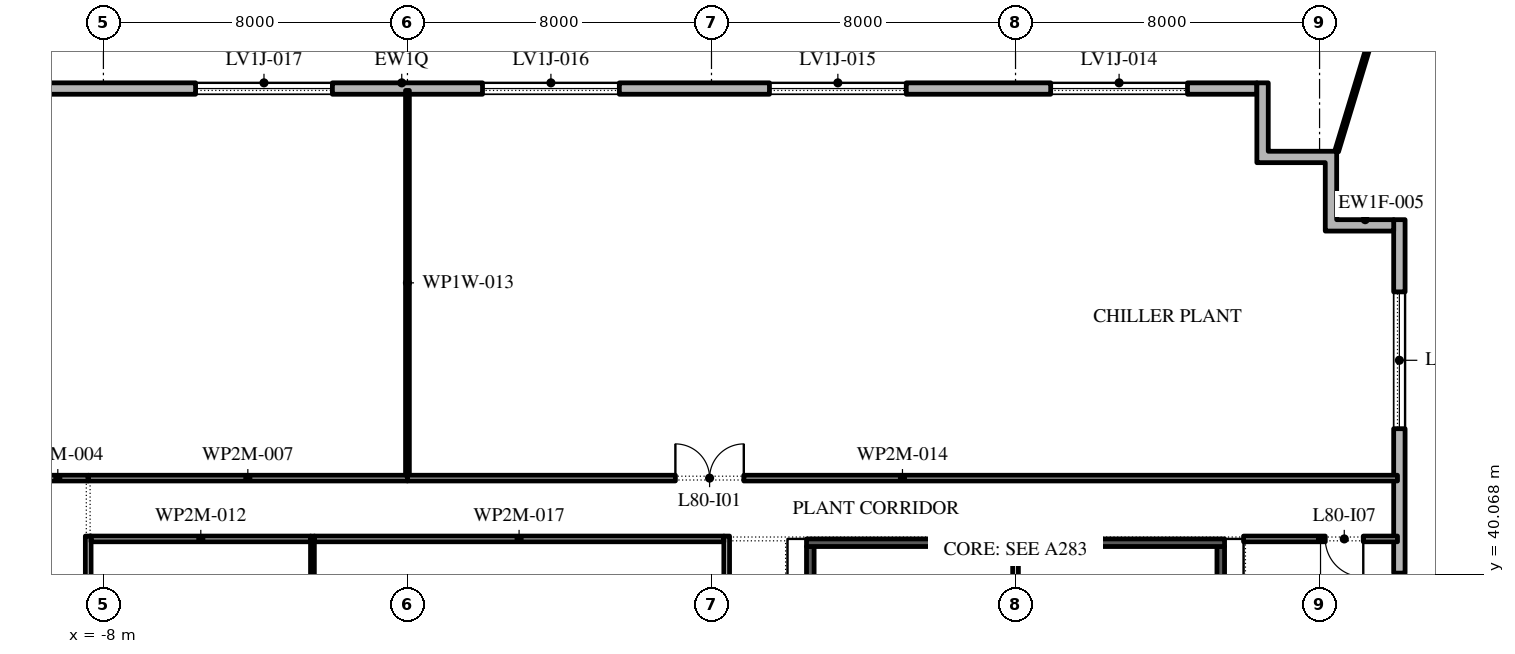
"""IFC4 building model, lengths in metres.
Left out: names, types, materials, properties, quantities, classifications, styles, units other than length and angle.
Written with IfcOpenShell. Run it as: python <this file> out.ifc"""

import sys

from ifc_helpers import new_model, si_unit, direction, frame, frame_2d, origin, place, context, subcontext, project, spatial, polyline, rectangle, outline, extrude, element, fill, save


model = new_model("IFC4")
c1 = context("Model", 3, precision=1e-05, world=origin(), true_north=direction((0.0, 1.0)))
c2 = subcontext(c1, "Body", "Model", "MODEL_VIEW")
j1 = project(units=[si_unit("LENGTHUNIT", "METRE"), si_unit("PLANEANGLEUNIT", "RADIAN")], contexts=[c1])
p1 = place(None, origin())
s1 = spatial("IfcSite", under=j1, at=p1, CompositionType="ELEMENT")
p2 = place(p1, origin())
s2 = spatial("IfcBuilding", under=s1, at=p2, CompositionType="ELEMENT")
p3 = place(p2, frame((0.0, 0.0, 363.6)))
s3 = spatial("IfcBuildingStorey", under=s2, at=p3, CompositionType="ELEMENT", Elevation=363.6)
p4 = place(p3, frame((26.1, -2.1, 0.0), z_axis=(0.0, 0.0, 1.0), x_axis=(0.0, 1.0, 0.0)))
e1 = element("IfcWall", 1, at=p4, inside=s3, PredefinedType="STANDARD", context=c2, shape_type="SweptSolid", body=[
    extrude(rectangle(XDim=51.5, YDim=0.3, at=frame_2d((25.75, 0.0))), origin(), (0.0, 0.0, 1.0), 5.2),
])
p5 = place(p4, frame((1.75, 0.0, 0.6)))
e2 = element("IfcOpeningElement", 2, at=p5, cuts=e1, PredefinedType="OPENING", context=c2, shape_type="SweptSolid", body=[
    extrude(rectangle(XDim=3.6, YDim=4.1, at=frame_2d((1.8, 2.05))), frame((0.0, 0.16, 0.0), z_axis=(0.0, -1.0, 0.0), x_axis=(1.0, 0.0, 0.0)), (0.0, 0.0, 1.0), 0.32),
])
p6 = place(p4, frame((9.0, 0.0, 0.6)))
e3 = element("IfcOpeningElement", 3, at=p6, cuts=e1, PredefinedType="OPENING", context=c2, shape_type="SweptSolid", body=[
    extrude(rectangle(XDim=3.6, YDim=4.1, at=frame_2d((1.8, 2.05))), frame((0.0, 0.16, 0.0), z_axis=(0.0, -1.0, 0.0), x_axis=(1.0, 0.0, 0.0)), (0.0, 0.0, 1.0), 0.32),
])
p7 = place(p4, frame((16.4, 0.0, 0.6)))
e4 = element("IfcOpeningElement", 4, at=p7, cuts=e1, PredefinedType="OPENING", context=c2, shape_type="SweptSolid", body=[
    extrude(rectangle(XDim=3.6, YDim=4.15, at=frame_2d((1.8, 2.075))), frame((0.0, 0.16, 0.0), z_axis=(0.0, -1.0, 0.0), x_axis=(1.0, 0.0, 0.0)), (0.0, 0.0, 1.0), 0.32),
])
p8 = place(p4, frame((23.8, 0.0, 0.6)))
e5 = element("IfcOpeningElement", 5, at=p8, cuts=e1, PredefinedType="OPENING", context=c2, shape_type="SweptSolid", body=[
    extrude(rectangle(XDim=3.6, YDim=4.15, at=frame_2d((1.8, 2.075))), frame((0.0, 0.16, 0.0), z_axis=(0.0, -1.0, 0.0), x_axis=(1.0, 0.0, 0.0)), (0.0, 0.0, 1.0), 0.32),
])
p9 = place(p4, frame((31.2, 0.0, 0.6)))
e6 = element("IfcOpeningElement", 6, at=p9, cuts=e1, PredefinedType="OPENING", context=c2, shape_type="SweptSolid", body=[
    extrude(rectangle(XDim=3.6, YDim=4.15, at=frame_2d((1.8, 2.075))), frame((0.0, 0.16, 0.0), z_axis=(0.0, -1.0, 0.0), x_axis=(1.0, 0.0, 0.0)), (0.0, 0.0, 1.0), 0.32),
])
p10 = place(p4, frame((38.6, 0.0, 0.6)))
e7 = element("IfcOpeningElement", 7, at=p10, cuts=e1, PredefinedType="OPENING", context=c2, shape_type="SweptSolid", body=[
    extrude(rectangle(XDim=3.6, YDim=4.15, at=frame_2d((1.8, 2.075))), frame((0.0, 0.16, 0.0), z_axis=(0.0, -1.0, 0.0), x_axis=(1.0, 0.0, 0.0)), (0.0, 0.0, 1.0), 0.32),
])
p11 = place(p4, frame((46.0, 0.0, 0.6)))
e8 = element("IfcOpeningElement", 8, at=p11, cuts=e1, PredefinedType="OPENING", context=c2, shape_type="SweptSolid", body=[
    extrude(rectangle(XDim=3.6, YDim=4.15, at=frame_2d((1.8, 2.075))), frame((0.0, 0.16, 0.0), z_axis=(0.0, -1.0, 0.0), x_axis=(1.0, 0.0, 0.0)), (0.0, 0.0, 1.0), 0.32),
])
p12 = place(p3, frame((22.35, 52.85, 0.0), z_axis=(0.0, 0.0, 1.0), x_axis=(-1.0, 0.0, 0.0)))
e9 = element("IfcWall", 9, at=p12, inside=s3, PredefinedType="STANDARD", context=c2, shape_type="SweptSolid", body=[
    extrude(rectangle(XDim=45.0, YDim=0.3, at=frame_2d((22.5, 0.0))), origin(), (0.0, 0.0, 1.0), 4.22),
])
p13 = place(p12, frame((1.825, 0.0, 0.6)))
e10 = element("IfcOpeningElement", 10, at=p13, cuts=e9, PredefinedType="OPENING", context=c2, shape_type="SweptSolid", body=[
    extrude(rectangle(XDim=3.6, YDim=3.5, at=frame_2d((1.8, 1.75))), frame((0.0, 0.16, 0.0), z_axis=(0.0, -1.0, 0.0), x_axis=(1.0, 0.0, 0.0)), (0.0, 0.0, 1.0), 0.32),
])
p14 = place(p12, frame((9.225, 0.0, 0.6)))
e11 = element("IfcOpeningElement", 11, at=p14, cuts=e9, PredefinedType="OPENING", context=c2, shape_type="SweptSolid", body=[
    extrude(rectangle(XDim=3.6, YDim=3.5, at=frame_2d((1.8, 1.75))), frame((0.0, 0.16, 0.0), z_axis=(0.0, -1.0, 0.0), x_axis=(1.0, 0.0, 0.0)), (0.0, 0.0, 1.0), 0.32),
])
p15 = place(p12, frame((16.775, 0.0, 0.6)))
e12 = element("IfcOpeningElement", 12, at=p15, cuts=e9, PredefinedType="OPENING", context=c2, shape_type="SweptSolid", body=[
    extrude(rectangle(XDim=3.6, YDim=3.5, at=frame_2d((1.8, 1.75))), frame((0.0, 0.16, 0.0), z_axis=(0.0, -1.0, 0.0), x_axis=(1.0, 0.0, 0.0)), (0.0, 0.0, 1.0), 0.32),
])
p16 = place(p12, frame((24.325, 0.0, 0.6)))
e13 = element("IfcOpeningElement", 13, at=p16, cuts=e9, PredefinedType="OPENING", context=c2, shape_type="SweptSolid", body=[
    extrude(rectangle(XDim=3.6, YDim=3.5, at=frame_2d((1.8, 1.75))), frame((0.0, 0.16, 0.0), z_axis=(0.0, -1.0, 0.0), x_axis=(1.0, 0.0, 0.0)), (0.0, 0.0, 1.0), 0.32),
])
p17 = place(p12, frame((31.875, 0.0, 0.6)))
e14 = element("IfcOpeningElement", 14, at=p17, cuts=e9, PredefinedType="OPENING", context=c2, shape_type="SweptSolid", body=[
    extrude(rectangle(XDim=3.6, YDim=3.5, at=frame_2d((1.8, 1.75))), frame((0.0, 0.16, 0.0), z_axis=(0.0, -1.0, 0.0), x_axis=(1.0, 0.0, 0.0)), (0.0, 0.0, 1.0), 0.32),
])
p18 = place(p12, frame((39.425, 0.0, 0.6)))
e15 = element("IfcOpeningElement", 15, at=p18, cuts=e9, PredefinedType="OPENING", context=c2, shape_type="SweptSolid", body=[
    extrude(rectangle(XDim=3.6, YDim=3.5, at=frame_2d((1.8, 1.75))), frame((0.0, 0.16, 0.0), z_axis=(0.0, -1.0, 0.0), x_axis=(1.0, 0.0, 0.0)), (0.0, 0.0, 1.0), 0.32),
])
p19 = place(p3, origin())
e16 = element("IfcWall", 16, at=p19, inside=s3, PredefinedType="STANDARD", context=c2, shape_type="SweptSolid", body=[
    extrude(outline(polyline([(24.15, 50.9), (22.35, 50.9), (22.35, 53.0), (22.65, 53.0), (22.65, 51.2), (24.45, 51.2), (24.45, 49.4), (25.95, 49.4), (25.95, 49.1), (24.15, 49.1), (24.15, 50.9)])), origin(), (0.0, 0.0, 1.0), 5.2),
])
p20 = place(p3, frame((24.45, 51.2, -0.05), z_axis=(0.0, 0.0, 1.0), x_axis=(0.290383107351, 0.956910471761, 0.0)))
e17 = element("IfcWall", 17, at=p20, inside=s3, PredefinedType="STANDARD", context=c2, shape_type="SweptSolid", body=[
    extrude(rectangle(XDim=7.538, YDim=0.1, at=frame_2d((3.769, 0.0))), origin(), (0.0, 0.0, 1.0), 5.25),
])
p21 = place(p3, frame((21.4, 25.75, 0.0), z_axis=(0.0, 0.0, 1.0), x_axis=(0.0, 1.0, 0.0)))
e18 = element("IfcWall", 18, at=p21, inside=s3, PredefinedType="SHEAR", context=c2, shape_type="SweptSolid", body=[
    extrude(rectangle(XDim=15.05, YDim=0.2, at=frame_2d((7.525, 0.0))), origin(), (0.0, 0.0, 1.0), 5.2),
])
p22 = place(p21, frame((6.625, 0.0, 0.0)))
e19 = element("IfcOpeningElement", 19, at=p22, cuts=e18, PredefinedType="OPENING", context=c2, shape_type="SweptSolid", body=[
    extrude(rectangle(XDim=1.8, YDim=2.4, at=frame_2d((0.9, 1.2))), frame((0.0, 0.11, 0.0), z_axis=(0.0, -1.0, 0.0), x_axis=(1.0, 0.0, 0.0)), (0.0, 0.0, 1.0), 0.22),
])
p23 = place(p3, frame((10.6, 25.75, 0.0), z_axis=(0.0, 0.0, 1.0), x_axis=(0.0, 1.0, 0.0)))
e20 = element("IfcWall", 20, at=p23, inside=s3, PredefinedType="SHEAR", context=c2, shape_type="SweptSolid", body=[
    extrude(rectangle(XDim=15.05, YDim=0.2, at=frame_2d((7.525, 0.0))), origin(), (0.0, 0.0, 1.0), 5.2),
])
p24 = place(p23, frame((2.837, 0.0, 0.0)))
e21 = element("IfcOpeningElement", 21, at=p24, cuts=e20, PredefinedType="OPENING", context=c2, shape_type="SweptSolid", body=[
    extrude(rectangle(XDim=1.8, YDim=2.4, at=frame_2d((0.9, 1.2))), frame((0.0, 0.11, 0.0), z_axis=(0.0, -1.0, 0.0), x_axis=(1.0, 0.0, 0.0)), (0.0, 0.0, 1.0), 0.22),
])
p25 = place(p23, frame((10.438, 0.0, 0.0)))
e22 = element("IfcOpeningElement", 22, at=p25, cuts=e20, PredefinedType="OPENING", context=c2, shape_type="SweptSolid", body=[
    extrude(rectangle(XDim=1.8, YDim=2.4, at=frame_2d((0.9, 1.2))), frame((0.0, 0.11, 0.0), z_axis=(0.0, -1.0, 0.0), x_axis=(1.0, 0.0, 0.0)), (0.0, 0.0, 1.0), 0.22),
])
p26 = place(p3, frame((10.5, 40.9, 0.0), z_axis=(0.0, 0.0, 1.0), x_axis=(1.0, 0.0, 0.0)))
e23 = element("IfcWall", 23, at=p26, inside=s3, PredefinedType="SHEAR", context=c2, shape_type="SweptSolid", body=[
    extrude(rectangle(XDim=11.0, YDim=0.2, at=frame_2d((5.5, 0.0))), origin(), (0.0, 0.0, 1.0), 5.2),
])
p27 = place(p3, frame((16.0, 25.75, 0.0), z_axis=(0.0, 0.0, 1.0), x_axis=(0.0, 1.0, 0.0)))
e24 = element("IfcWall", 24, at=p27, inside=s3, PredefinedType="PARTITIONING", context=c2, shape_type="SweptSolid", body=[
    extrude(rectangle(XDim=15.05, YDim=0.15, at=frame_2d((7.525, 0.0))), origin(), (0.0, 0.0, 1.0), 5.2),
])
p28 = place(p3, frame((-10.0, 42.6, 0.0), z_axis=(0.0, 0.0, 1.0), x_axis=(1.0, 0.0, 0.0)))
e25 = element("IfcWall", 25, at=p28, inside=s3, PredefinedType="PARTITIONING", context=c2, shape_type="SweptSolid", body=[
    extrude(rectangle(XDim=1.6, YDim=0.15, at=frame_2d((0.8, 0.0))), origin(), (0.0, 0.0, 1.0), 5.2),
])
p29 = place(p3, frame((-8.4, 41.075, 0.0), z_axis=(0.0, 0.0, 1.0), x_axis=(0.0, -1.0, 0.0)))
e26 = element("IfcWall", 26, at=p29, inside=s3, PredefinedType="PARTITIONING", context=c2, shape_type="SweptSolid", body=[
    extrude(rectangle(XDim=22.0, YDim=0.15, at=frame_2d((11.0, 0.0))), origin(), (0.0, 0.0, 1.0), 5.2),
])
p30 = place(p29, frame((14.925, 0.0, 0.0)))
e27 = element("IfcOpeningElement", 27, at=p30, cuts=e26, PredefinedType="OPENING", context=c2, shape_type="SweptSolid", body=[
    extrude(rectangle(XDim=1.0, YDim=2.1, at=frame_2d((0.5, 1.05))), frame((0.0, 0.085, 0.0), z_axis=(0.0, -1.0, 0.0), x_axis=(1.0, 0.0, 0.0)), (0.0, 0.0, 1.0), 0.17),
])
p31 = place(p3, frame((-8.4, 42.6, 0.0), z_axis=(0.0, 0.0, 1.0), x_axis=(1.0, 0.0, 0.0)))
e28 = element("IfcWall", 28, at=p31, inside=s3, PredefinedType="PARTITIONING", context=c2, shape_type="SweptSolid", body=[
    extrude(rectangle(XDim=8.4, YDim=0.15, at=frame_2d((4.2, 0.0))), origin(), (0.0, 0.0, 1.0), 5.2),
])
p32 = place(p3, frame((-2.5, 26.45, 0.0), z_axis=(0.0, 0.0, 1.0), x_axis=(0.0, 1.0, 0.0)))
e29 = element("IfcWall", 29, at=p32, inside=s3, PredefinedType="PARTITIONING", context=c2, shape_type="SweptSolid", body=[
    extrude(rectangle(XDim=14.625, YDim=0.1, at=frame_2d((7.312, 0.0))), origin(), (0.0, 0.0, 1.0), 4.22),
])
p33 = place(p3, frame((-2.55, 41.0, 0.0), z_axis=(0.0, 0.0, 1.0), x_axis=(-1.0, 0.0, 0.0)))
e30 = element("IfcWall", 30, at=p33, inside=s3, PredefinedType="PARTITIONING", context=c2, shape_type="SweptSolid", body=[
    extrude(rectangle(XDim=5.775, YDim=0.15, at=frame_2d((2.887, 0.0))), origin(), (0.0, 0.0, 1.0), 5.2),
])
p34 = place(p3, frame((0.0, 42.675, 0.0), z_axis=(0.0, 0.0, 1.0), x_axis=(0.0, 1.0, 0.0)))
e31 = element("IfcWall", 31, at=p34, inside=s3, PredefinedType="PARTITIONING", context=c2, shape_type="SweptSolid", body=[
    extrude(rectangle(XDim=10.125, YDim=0.1, at=frame_2d((5.062, 0.0))), origin(), (0.0, 0.0, 1.0), 5.2),
])
p35 = place(p3, frame((0.0, 42.6, 0.0), z_axis=(0.0, 0.0, 1.0), x_axis=(1.0, 0.0, 0.0)))
e32 = element("IfcWall", 32, at=p35, inside=s3, PredefinedType="PARTITIONING", context=c2, shape_type="SweptSolid", body=[
    extrude(rectangle(XDim=26.05, YDim=0.15, at=frame_2d((13.025, 0.0))), origin(), (0.0, 0.0, 1.0), 5.2),
])
p36 = place(p35, frame((7.05, 0.0, 0.0)))
e33 = element("IfcOpeningElement", 33, at=p36, cuts=e32, PredefinedType="OPENING", context=c2, shape_type="SweptSolid", body=[
    extrude(rectangle(XDim=1.8, YDim=2.1, at=frame_2d((0.9, 1.05))), frame((0.0, 0.085, 0.0), z_axis=(0.0, -1.0, 0.0), x_axis=(1.0, 0.0, 0.0)), (0.0, 0.0, 1.0), 0.17),
])
p37 = place(p3, frame((8.4, 26.55, 0.0), z_axis=(0.0, 0.0, 1.0), x_axis=(0.0, 1.0, 0.0)))
e34 = element("IfcWall", 34, at=p37, inside=s3, PredefinedType="PARTITIONING", context=c2, shape_type="SweptSolid", body=[
    extrude(rectangle(XDim=14.525, YDim=0.15, at=frame_2d((7.262, 0.0))), origin(), (0.0, 0.0, 1.0), 5.2),
])
p38 = place(p37, frame((8.05, 0.0, 0.0)))
e35 = element("IfcOpeningElement", 35, at=p38, cuts=e34, PredefinedType="OPENING", context=c2, shape_type="SweptSolid", body=[
    extrude(rectangle(XDim=1.0, YDim=2.1, at=frame_2d((0.5, 1.05))), frame((0.0, 0.085, 0.0), z_axis=(0.0, -1.0, 0.0), x_axis=(1.0, 0.0, 0.0)), (0.0, 0.0, 1.0), 0.17),
])
p39 = place(p3, frame((8.325, 41.0, 0.0), z_axis=(0.0, 0.0, 1.0), x_axis=(-1.0, 0.0, 0.0)))
e36 = element("IfcWall", 36, at=p39, inside=s3, PredefinedType="PARTITIONING", context=c2, shape_type="SweptSolid", body=[
    extrude(rectangle(XDim=10.775, YDim=0.15, at=frame_2d((5.387, 0.0))), origin(), (0.0, 0.0, 1.0), 5.2),
])
p40 = place(p3, frame((26.05, 41.0, 0.0), z_axis=(0.0, 0.0, 1.0), x_axis=(-1.0, 0.0, 0.0)))
e37 = element("IfcWall", 37, at=p40, inside=s3, PredefinedType="PARTITIONING", context=c2, shape_type="SweptSolid", body=[
    extrude(rectangle(XDim=4.05, YDim=0.15, at=frame_2d((2.025, 0.0))), origin(), (0.0, 0.0, 1.0), 5.2),
])
p41 = place(p40, frame((0.9, 0.0, 0.0)))
e38 = element("IfcOpeningElement", 38, at=p41, cuts=e37, PredefinedType="OPENING", context=c2, shape_type="SweptSolid", body=[
    extrude(rectangle(XDim=1.0, YDim=2.1, at=frame_2d((0.5, 1.05))), frame((0.0, 0.085, 0.0), z_axis=(0.0, -1.0, 0.0), x_axis=(1.0, 0.0, 0.0)), (0.0, 0.0, 1.0), 0.17),
])
p42 = place(p10, origin())
e39 = element("IfcWindow", 39, at=p42, inside=s3, PartitioningType="DOUBLE_PANEL_HORIZONTAL", PredefinedType="WINDOW", context=c2, shape_type="SweptSolid", body=[
    extrude(rectangle(XDim=3.6, YDim=4.15, at=frame_2d((1.8, 2.075))), frame((0.0, 0.03, 0.0), z_axis=(0.0, -1.0, 0.0), x_axis=(1.0, 0.0, 0.0)), (0.0, 0.0, 1.0), 0.06),
])
fill(e7, e39)
p43 = place(p11, origin())
e40 = element("IfcWindow", 40, at=p43, inside=s3, PartitioningType="DOUBLE_PANEL_HORIZONTAL", PredefinedType="WINDOW", context=c2, shape_type="SweptSolid", body=[
    extrude(rectangle(XDim=3.6, YDim=4.15, at=frame_2d((1.8, 2.075))), frame((0.0, 0.03, 0.0), z_axis=(0.0, -1.0, 0.0), x_axis=(1.0, 0.0, 0.0)), (0.0, 0.0, 1.0), 0.06),
])
fill(e8, e40)
p44 = place(p13, origin())
e41 = element("IfcWindow", 41, at=p44, inside=s3, PartitioningType="DOUBLE_PANEL_HORIZONTAL", PredefinedType="WINDOW", context=c2, shape_type="SweptSolid", body=[
    extrude(rectangle(XDim=3.6, YDim=3.5, at=frame_2d((1.8, 1.75))), frame((0.0, 0.03, 0.0), z_axis=(0.0, -1.0, 0.0), x_axis=(1.0, 0.0, 0.0)), (0.0, 0.0, 1.0), 0.06),
])
fill(e10, e41)
p45 = place(p14, origin())
e42 = element("IfcWindow", 42, at=p45, inside=s3, PartitioningType="DOUBLE_PANEL_HORIZONTAL", PredefinedType="WINDOW", context=c2, shape_type="SweptSolid", body=[
    extrude(rectangle(XDim=3.6, YDim=3.5, at=frame_2d((1.8, 1.75))), frame((0.0, 0.03, 0.0), z_axis=(0.0, -1.0, 0.0), x_axis=(1.0, 0.0, 0.0)), (0.0, 0.0, 1.0), 0.06),
])
fill(e11, e42)
p46 = place(p15, origin())
e43 = element("IfcWindow", 43, at=p46, inside=s3, PartitioningType="DOUBLE_PANEL_HORIZONTAL", PredefinedType="WINDOW", context=c2, shape_type="SweptSolid", body=[
    extrude(rectangle(XDim=3.6, YDim=3.5, at=frame_2d((1.8, 1.75))), frame((0.0, 0.03, 0.0), z_axis=(0.0, -1.0, 0.0), x_axis=(1.0, 0.0, 0.0)), (0.0, 0.0, 1.0), 0.06),
])
fill(e12, e43)
p47 = place(p16, origin())
e44 = element("IfcWindow", 44, at=p47, inside=s3, PartitioningType="DOUBLE_PANEL_HORIZONTAL", PredefinedType="WINDOW", context=c2, shape_type="SweptSolid", body=[
    extrude(rectangle(XDim=3.6, YDim=3.5, at=frame_2d((1.8, 1.75))), frame((0.0, 0.03, 0.0), z_axis=(0.0, -1.0, 0.0), x_axis=(1.0, 0.0, 0.0)), (0.0, 0.0, 1.0), 0.06),
])
fill(e13, e44)
p48 = place(p36, origin())
e45 = element("IfcDoor", 45, at=p48, inside=s3, OperationType="SINGLE_SWING_RIGHT", PredefinedType="DOOR", context=c2, shape_type="SweptSolid", body=[
    extrude(rectangle(XDim=1.8, YDim=2.1, at=frame_2d((0.9, 1.05))), frame((0.0, 0.025, 0.0), z_axis=(0.0, -1.0, 0.0), x_axis=(1.0, 0.0, 0.0)), (0.0, 0.0, 1.0), 0.05),
])
fill(e33, e45)
p49 = place(p41, origin())
e46 = element("IfcDoor", 46, at=p49, inside=s3, OperationType="SINGLE_SWING_RIGHT", PredefinedType="DOOR", context=c2, shape_type="SweptSolid", body=[
    extrude(rectangle(XDim=1.0, YDim=2.1, at=frame_2d((0.5, 1.05))), frame((0.0, 0.025, 0.0), z_axis=(0.0, -1.0, 0.0), x_axis=(1.0, 0.0, 0.0)), (0.0, 0.0, 1.0), 0.05),
])
fill(e38, e46)
save(model, sys.argv[1])
